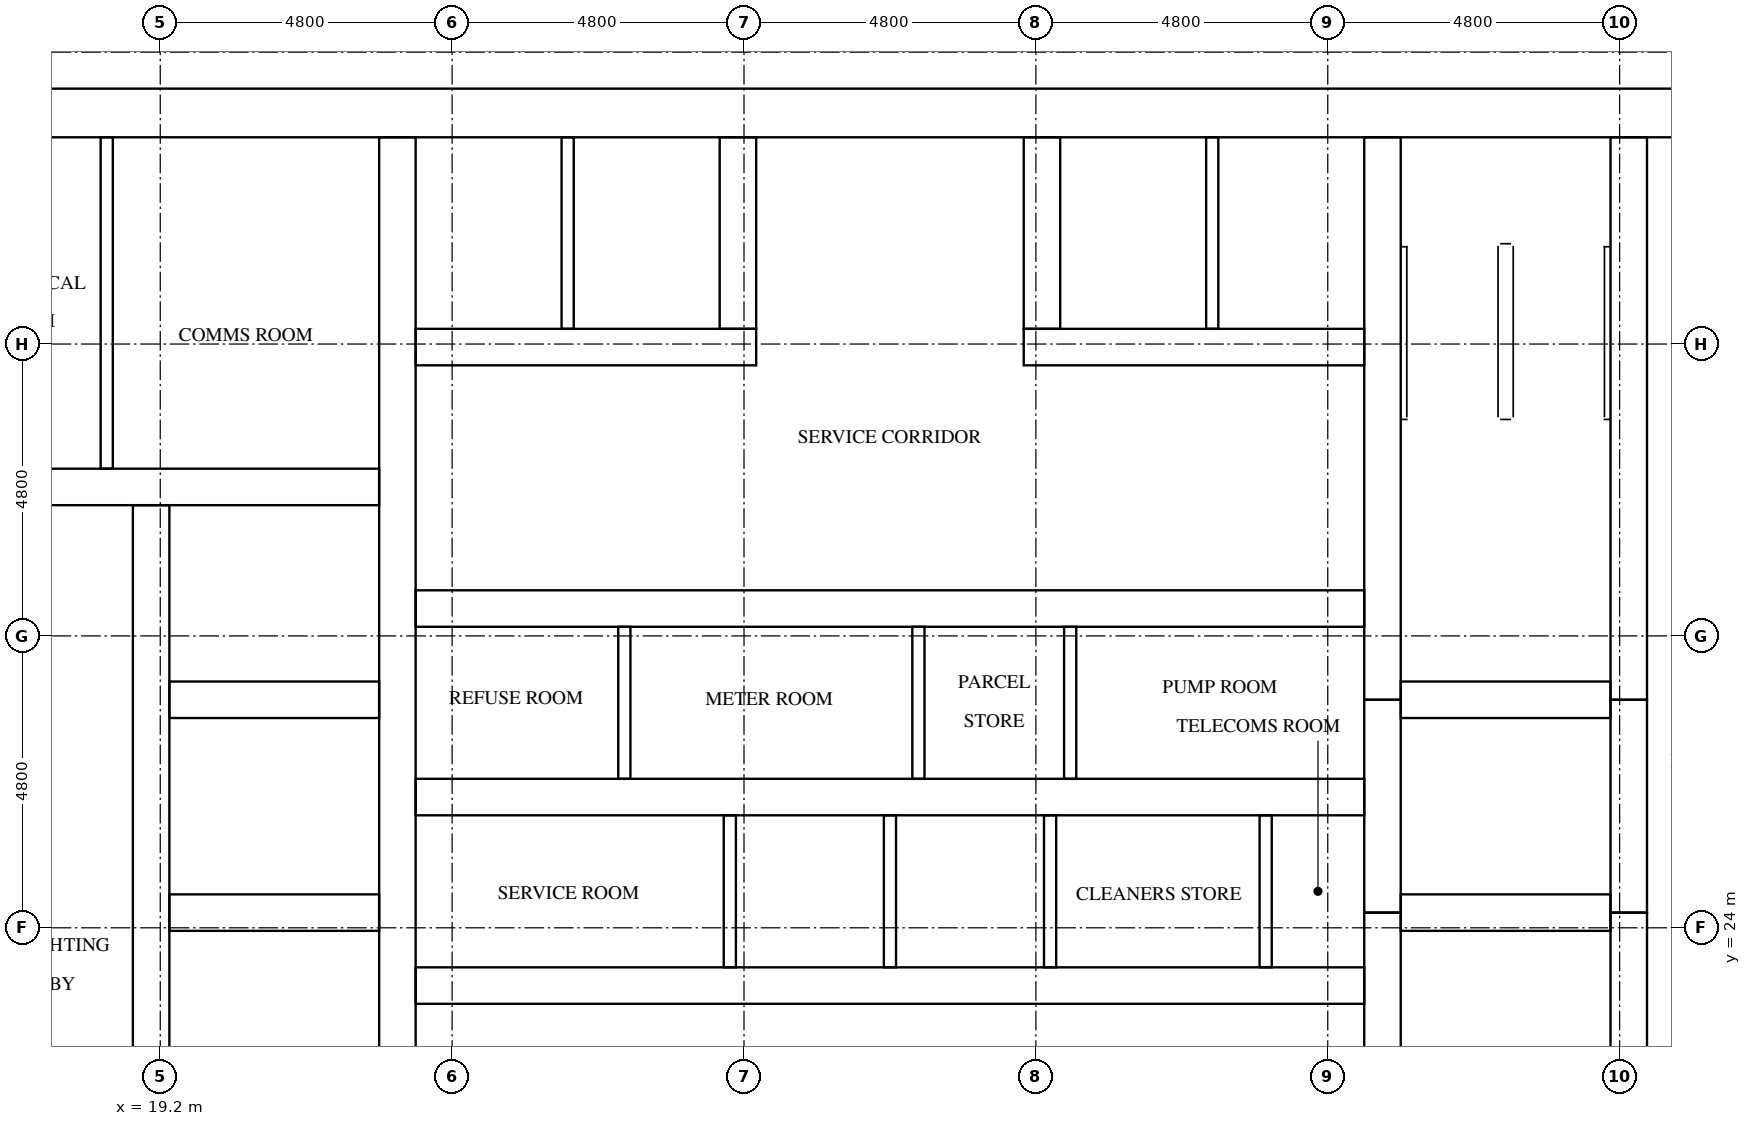
"""IFC4 building model, lengths in metres.
Left out: names, types, materials, properties, quantities, classifications, styles, units other than length and angle.
Written with IfcOpenShell. Run it as: python <this file> out.ifc"""

import sys

from ifc_helpers import new_model, si_unit, direction, frame, frame_2d, origin, place, context, subcontext, project, spatial, rectangle, extrude, element, fill, save


model = new_model("IFC4")
c1 = context("Model", 3, precision=1e-05, world=origin(), true_north=direction((0.0, 1.0)))
c2 = subcontext(c1, "Body", "Model", "MODEL_VIEW")
j1 = project(units=[si_unit("LENGTHUNIT", "METRE"), si_unit("PLANEANGLEUNIT", "RADIAN")], contexts=[c1])
p1 = place(None, origin())
s1 = spatial("IfcSite", under=j1, at=p1, CompositionType="ELEMENT")
p2 = place(p1, origin())
s2 = spatial("IfcBuilding", under=s1, at=p2, CompositionType="ELEMENT")
p3 = place(p2, frame((0.0, 0.0, 136.6)))
s3 = spatial("IfcBuildingStorey", under=s2, at=p3, CompositionType="ELEMENT", Elevation=136.6)
p4 = place(p3, frame((15.0, 37.4, 0.0), z_axis=(0.0, 0.0, 1.0), x_axis=(1.0, 0.0, 0.0)))
e1 = element("IfcWall", 1, at=p4, inside=s3, PredefinedType="SHEAR", context=c2, shape_type="SweptSolid", body=[
    extrude(rectangle(XDim=32.4, YDim=0.8, at=frame_2d((16.2, 0.0))), origin(), (0.0, 0.0, 1.0), 3.2),
])
p5 = place(p4, frame((15.3, 0.0, 0.0)))
e2 = element("IfcOpeningElement", 2, at=p5, cuts=e1, PredefinedType="OPENING", context=c2, shape_type="SweptSolid", body=[
    extrude(rectangle(XDim=1.8, YDim=2.1, at=frame_2d((0.9, 1.05))), frame((0.0, 0.41, 0.0), z_axis=(0.0, -1.0, 0.0), x_axis=(1.0, 0.0, 0.0)), (0.0, 0.0, 1.0), 0.82),
])
p6 = place(p4, frame((1.51, 0.0, 0.0)))
e3 = element("IfcOpeningElement", 3, at=p6, cuts=e1, PredefinedType="OPENING", context=c2, shape_type="SweptSolid", body=[
    extrude(rectangle(XDim=1.0, YDim=2.1, at=frame_2d((0.5, 1.05))), frame((0.0, 0.41, 0.0), z_axis=(0.0, -1.0, 0.0), x_axis=(1.0, 0.0, 0.0)), (0.0, 0.0, 1.0), 0.82),
])
p7 = place(p4, frame((5.11, 0.0, 0.0)))
e4 = element("IfcOpeningElement", 4, at=p7, cuts=e1, PredefinedType="OPENING", context=c2, shape_type="SweptSolid", body=[
    extrude(rectangle(XDim=1.0, YDim=2.1, at=frame_2d((0.5, 1.05))), frame((0.0, 0.41, 0.0), z_axis=(0.0, -1.0, 0.0), x_axis=(1.0, 0.0, 0.0)), (0.0, 0.0, 1.0), 0.82),
])
p8 = place(p3, frame((19.05, 15.8, 0.0), z_axis=(0.0, 0.0, 1.0), x_axis=(0.0, 1.0, 0.0)))
e5 = element("IfcWall", 5, at=p8, inside=s3, PredefinedType="SHEAR", context=c2, shape_type="SweptSolid", body=[
    extrude(rectangle(XDim=15.15, YDim=0.6, at=frame_2d((7.575, 0.0))), origin(), (0.0, 0.0, 1.0), 3.2),
])
p9 = place(p8, frame((9.65, 0.0, 0.0)))
e6 = element("IfcOpeningElement", 6, at=p9, cuts=e5, PredefinedType="OPENING", context=c2, shape_type="SweptSolid", body=[
    extrude(rectangle(XDim=1.1, YDim=2.1, at=frame_2d((0.55, 1.05))), frame((0.0, 0.31, 0.0), z_axis=(0.0, -1.0, 0.0), x_axis=(1.0, 0.0, 0.0)), (0.0, 0.0, 1.0), 0.62),
])
p10 = place(p8, frame((13.15, 0.0, 0.0)))
e7 = element("IfcOpeningElement", 7, at=p10, cuts=e5, PredefinedType="OPENING", context=c2, shape_type="SweptSolid", body=[
    extrude(rectangle(XDim=1.1, YDim=2.1, at=frame_2d((0.55, 1.05))), frame((0.0, 0.31, 0.0), z_axis=(0.0, -1.0, 0.0), x_axis=(1.0, 0.0, 0.0)), (0.0, 0.0, 1.0), 0.62),
])
p11 = place(p8, frame((0.4, 0.0, 0.0)))
e8 = element("IfcOpeningElement", 8, at=p11, cuts=e5, PredefinedType="OPENING", context=c2, shape_type="SweptSolid", body=[
    extrude(rectangle(XDim=1.2, YDim=2.1, at=frame_2d((0.6, 1.05))), frame((0.0, 0.31, 0.0), z_axis=(0.0, -1.0, 0.0), x_axis=(1.0, 0.0, 0.0)), (0.0, 0.0, 1.0), 0.62),
])
p12 = place(p3, frame((23.1, 15.8, 0.0), z_axis=(0.0, 0.0, 1.0), x_axis=(0.0, 1.0, 0.0)))
e9 = element("IfcWall", 9, at=p12, inside=s3, PredefinedType="SHEAR", context=c2, shape_type="SweptSolid", body=[
    extrude(rectangle(XDim=21.2, YDim=0.6, at=frame_2d((10.6, 0.0))), origin(), (0.0, 0.0, 1.0), 3.2),
])
p13 = place(p3, frame((39.3, 15.8, 0.0), z_axis=(0.0, 0.0, 1.0), x_axis=(0.0, 1.0, 0.0)))
e10 = element("IfcWall", 10, at=p13, inside=s3, PredefinedType="SHEAR", context=c2, shape_type="SweptSolid", body=[
    extrude(rectangle(XDim=8.45, YDim=0.6, at=frame_2d((4.225, 0.0))), origin(), (0.0, 0.0, 1.0), 3.2),
])
p14 = place(p3, frame((39.3, 24.25, 0.0), z_axis=(0.0, 0.0, 1.0), x_axis=(0.0, 1.0, 0.0)))
e11 = element("IfcWall", 11, at=p14, inside=s3, PredefinedType="SHEAR", context=c2, shape_type="SweptSolid", body=[
    extrude(rectangle(XDim=3.5, YDim=0.6, at=frame_2d((1.75, 0.0))), origin(), (0.0, 0.0, 1.0), 3.2),
])
p15 = place(p3, frame((39.3, 27.75, 0.0), z_axis=(0.0, 0.0, 1.0), x_axis=(0.0, 1.0, 0.0)))
e12 = element("IfcWall", 12, at=p15, inside=s3, PredefinedType="SHEAR", context=c2, shape_type="SweptSolid", body=[
    extrude(rectangle(XDim=9.25, YDim=0.6, at=frame_2d((4.625, 0.0))), origin(), (0.0, 0.0, 1.0), 3.2),
])
p16 = place(p3, frame((43.35, 15.8, 0.0), z_axis=(0.0, 0.0, 1.0), x_axis=(0.0, 1.0, 0.0)))
e13 = element("IfcWall", 13, at=p16, inside=s3, PredefinedType="SHEAR", context=c2, shape_type="SweptSolid", body=[
    extrude(rectangle(XDim=8.45, YDim=0.6, at=frame_2d((4.225, 0.0))), origin(), (0.0, 0.0, 1.0), 3.2),
])
p17 = place(p16, frame((0.4, 0.0, 0.0)))
e14 = element("IfcOpeningElement", 14, at=p17, cuts=e13, PredefinedType="OPENING", context=c2, shape_type="SweptSolid", body=[
    extrude(rectangle(XDim=1.2, YDim=2.1, at=frame_2d((0.6, 1.05))), frame((0.0, 0.31, 0.0), z_axis=(0.0, -1.0, 0.0), x_axis=(1.0, 0.0, 0.0)), (0.0, 0.0, 1.0), 0.62),
])
p18 = place(p3, frame((43.35, 24.25, 0.0), z_axis=(0.0, 0.0, 1.0), x_axis=(0.0, 1.0, 0.0)))
e15 = element("IfcWall", 15, at=p18, inside=s3, PredefinedType="SHEAR", context=c2, shape_type="SweptSolid", body=[
    extrude(rectangle(XDim=3.5, YDim=0.6, at=frame_2d((1.75, 0.0))), origin(), (0.0, 0.0, 1.0), 3.2),
])
p19 = place(p18, frame((1.2, 0.0, 0.0)))
e16 = element("IfcOpeningElement", 16, at=p19, cuts=e15, PredefinedType="OPENING", context=c2, shape_type="SweptSolid", body=[
    extrude(rectangle(XDim=1.1, YDim=2.1, at=frame_2d((0.55, 1.05))), frame((0.0, 0.31, 0.0), z_axis=(0.0, -1.0, 0.0), x_axis=(1.0, 0.0, 0.0)), (0.0, 0.0, 1.0), 0.62),
])
p20 = place(p3, frame((43.35, 27.75, 0.0), z_axis=(0.0, 0.0, 1.0), x_axis=(0.0, 1.0, 0.0)))
e17 = element("IfcWall", 17, at=p20, inside=s3, PredefinedType="SHEAR", context=c2, shape_type="SweptSolid", body=[
    extrude(rectangle(XDim=9.25, YDim=0.6, at=frame_2d((4.625, 0.0))), origin(), (0.0, 0.0, 1.0), 3.2),
])
p21 = place(p20, frame((7.65, 0.0, 0.0)))
e18 = element("IfcOpeningElement", 18, at=p21, cuts=e17, PredefinedType="OPENING", context=c2, shape_type="SweptSolid", body=[
    extrude(rectangle(XDim=1.2, YDim=2.1, at=frame_2d((0.6, 1.05))), frame((0.0, 0.31, 0.0), z_axis=(0.0, -1.0, 0.0), x_axis=(1.0, 0.0, 0.0)), (0.0, 0.0, 1.0), 0.62),
])
for number, where, z_axis, x_axis in (
    (19, (19.35, 24.25, 0.0), (0.0, 0.0, 1.0), (1.0, 0.0, 0.0)),
    (20, (19.35, 27.75, 0.0), (0.0, 0.0, 1.0), (1.0, 0.0, 0.0)),
):
    element("IfcWall", number, at=place(p3, frame(where, z_axis=z_axis, x_axis=x_axis)), inside=s3, PredefinedType="SHEAR", context=c2, shape_type="SweptSolid", body=[
        extrude(rectangle(XDim=3.45, YDim=0.6, at=frame_2d((1.725, 0.0))), origin(), (0.0, 0.0, 1.0), 3.2),
    ])
p22 = place(p3, frame((15.8, 31.25, 0.0), z_axis=(0.0, 0.0, 1.0), x_axis=(1.0, 0.0, 0.0)))
e21 = element("IfcWall", 21, at=p22, inside=s3, PredefinedType="SHEAR", context=c2, shape_type="SweptSolid", body=[
    extrude(rectangle(XDim=7.0, YDim=0.6, at=frame_2d((3.5, 0.0))), origin(), (0.0, 0.0, 1.0), 3.2),
])
for number, where, z_axis, x_axis in (
    (22, (39.6, 24.25, 0.0), (0.0, 0.0, 1.0), (1.0, 0.0, 0.0)),
    (23, (39.6, 27.75, 0.0), (0.0, 0.0, 1.0), (1.0, 0.0, 0.0)),
):
    element("IfcWall", number, at=place(p3, frame(where, z_axis=z_axis, x_axis=x_axis)), inside=s3, PredefinedType="SHEAR", context=c2, shape_type="SweptSolid", body=[
        extrude(rectangle(XDim=3.45, YDim=0.6, at=frame_2d((1.725, 0.0))), origin(), (0.0, 0.0, 1.0), 3.2),
    ])
p23 = place(p3, frame((23.4, 23.05, 0.0), z_axis=(0.0, 0.0, 1.0), x_axis=(1.0, 0.0, 0.0)))
e24 = element("IfcWall", 24, at=p23, inside=s3, PredefinedType="SHEAR", context=c2, shape_type="SweptSolid", body=[
    extrude(rectangle(XDim=15.6, YDim=0.6, at=frame_2d((7.8, 0.0))), origin(), (0.0, 0.0, 1.0), 3.2),
])
p24 = place(p23, frame((2.033, 0.0, 0.0)))
e25 = element("IfcOpeningElement", 25, at=p24, cuts=e24, PredefinedType="OPENING", context=c2, shape_type="SweptSolid", body=[
    extrude(rectangle(XDim=1.0, YDim=2.1, at=frame_2d((0.5, 1.05))), frame((0.0, 0.31, 0.0), z_axis=(0.0, -1.0, 0.0), x_axis=(1.0, 0.0, 0.0)), (0.0, 0.0, 1.0), 0.62),
])
p25 = place(p23, frame((11.706, 0.0, 0.0)))
e26 = element("IfcOpeningElement", 26, at=p25, cuts=e24, PredefinedType="OPENING", context=c2, shape_type="SweptSolid", body=[
    extrude(rectangle(XDim=1.0, YDim=2.1, at=frame_2d((0.5, 1.05))), frame((0.0, 0.31, 0.0), z_axis=(0.0, -1.0, 0.0), x_axis=(1.0, 0.0, 0.0)), (0.0, 0.0, 1.0), 0.62),
])
p26 = place(p23, frame((14.339, 0.0, 0.0)))
e27 = element("IfcOpeningElement", 27, at=p26, cuts=e24, PredefinedType="OPENING", context=c2, shape_type="SweptSolid", body=[
    extrude(rectangle(XDim=1.0, YDim=2.1, at=frame_2d((0.5, 1.05))), frame((0.0, 0.31, 0.0), z_axis=(0.0, -1.0, 0.0), x_axis=(1.0, 0.0, 0.0)), (0.0, 0.0, 1.0), 0.62),
])
p27 = place(p3, frame((23.4, 26.15, 0.0), z_axis=(0.0, 0.0, 1.0), x_axis=(1.0, 0.0, 0.0)))
e28 = element("IfcWall", 28, at=p27, inside=s3, PredefinedType="SHEAR", context=c2, shape_type="SweptSolid", body=[
    extrude(rectangle(XDim=15.6, YDim=0.6, at=frame_2d((7.8, 0.0))), origin(), (0.0, 0.0, 1.0), 3.2),
])
p28 = place(p3, frame((23.4, 29.25, 0.0), z_axis=(0.0, 0.0, 1.0), x_axis=(1.0, 0.0, 0.0)))
e29 = element("IfcWall", 29, at=p28, inside=s3, PredefinedType="SHEAR", context=c2, shape_type="SweptSolid", body=[
    extrude(rectangle(XDim=15.6, YDim=0.6, at=frame_2d((7.8, 0.0))), origin(), (0.0, 0.0, 1.0), 3.2),
])
p29 = place(p28, frame((1.166, 0.0, 0.0)))
e30 = element("IfcOpeningElement", 30, at=p29, cuts=e29, PredefinedType="OPENING", context=c2, shape_type="SweptSolid", body=[
    extrude(rectangle(XDim=1.0, YDim=2.1, at=frame_2d((0.5, 1.05))), frame((0.0, 0.31, 0.0), z_axis=(0.0, -1.0, 0.0), x_axis=(1.0, 0.0, 0.0)), (0.0, 0.0, 1.0), 0.62),
])
p30 = place(p28, frame((5.35, 0.0, 0.0)))
e31 = element("IfcOpeningElement", 31, at=p30, cuts=e29, PredefinedType="OPENING", context=c2, shape_type="SweptSolid", body=[
    extrude(rectangle(XDim=1.0, YDim=2.1, at=frame_2d((0.5, 1.05))), frame((0.0, 0.31, 0.0), z_axis=(0.0, -1.0, 0.0), x_axis=(1.0, 0.0, 0.0)), (0.0, 0.0, 1.0), 0.62),
])
p31 = place(p28, frame((9.016, 0.0, 0.0)))
e32 = element("IfcOpeningElement", 32, at=p31, cuts=e29, PredefinedType="OPENING", context=c2, shape_type="SweptSolid", body=[
    extrude(rectangle(XDim=1.0, YDim=2.1, at=frame_2d((0.5, 1.05))), frame((0.0, 0.31, 0.0), z_axis=(0.0, -1.0, 0.0), x_axis=(1.0, 0.0, 0.0)), (0.0, 0.0, 1.0), 0.62),
])
p32 = place(p28, frame((12.732, 0.0, 0.0)))
e33 = element("IfcOpeningElement", 33, at=p32, cuts=e29, PredefinedType="OPENING", context=c2, shape_type="SweptSolid", body=[
    extrude(rectangle(XDim=1.0, YDim=2.1, at=frame_2d((0.5, 1.05))), frame((0.0, 0.31, 0.0), z_axis=(0.0, -1.0, 0.0), x_axis=(1.0, 0.0, 0.0)), (0.0, 0.0, 1.0), 0.62),
])
for number, where, z_axis, x_axis in (
    (34, (23.4, 33.55, 0.0), (0.0, 0.0, 1.0), (1.0, 0.0, 0.0)),
    (35, (33.4, 33.55, 0.0), (0.0, 0.0, 1.0), (1.0, 0.0, 0.0)),
):
    element("IfcWall", number, at=place(p3, frame(where, z_axis=z_axis, x_axis=x_axis)), inside=s3, PredefinedType="SHEAR", context=c2, shape_type="SweptSolid", body=[
        extrude(rectangle(XDim=5.6, YDim=0.6, at=frame_2d((2.8, 0.0))), origin(), (0.0, 0.0, 1.0), 3.2),
    ])
for number, where, z_axis, x_axis in (
    (36, (28.7, 33.85, 0.0), (0.0, 0.0, 1.0), (0.0, 1.0, 0.0)),
    (37, (33.7, 33.85, 0.0), (0.0, 0.0, 1.0), (0.0, 1.0, 0.0)),
):
    element("IfcWall", number, at=place(p3, frame(where, z_axis=z_axis, x_axis=x_axis)), inside=s3, PredefinedType="SHEAR", context=c2, shape_type="SweptSolid", body=[
        extrude(rectangle(XDim=3.15, YDim=0.6, at=frame_2d((1.575, 0.0))), origin(), (0.0, 0.0, 1.0), 3.2),
    ])
for number, where, z_axis, x_axis in (
    (38, (28.567, 23.35, 0.0), (0.0, 0.0, 1.0), (0.0, 1.0, 0.0)),
    (39, (31.2, 23.35, 0.0), (0.0, 0.0, 1.0), (0.0, 1.0, 0.0)),
    (40, (33.833, 23.35, 0.0), (0.0, 0.0, 1.0), (0.0, 1.0, 0.0)),
):
    element("IfcWall", number, at=place(p3, frame(where, z_axis=z_axis, x_axis=x_axis)), inside=s3, PredefinedType="SOLIDWALL", context=c2, shape_type="SweptSolid", body=[
        extrude(rectangle(XDim=2.5, YDim=0.2, at=frame_2d((1.25, 0.0))), origin(), (0.0, 0.0, 1.0), 3.2),
    ])
for number, where, z_axis, x_axis in (
    (41, (25.9, 33.85, 0.0), (0.0, 0.0, 1.0), (0.0, 1.0, 0.0)),
    (42, (36.5, 33.85, 0.0), (0.0, 0.0, 1.0), (0.0, 1.0, 0.0)),
):
    element("IfcWall", number, at=place(p3, frame(where, z_axis=z_axis, x_axis=x_axis)), inside=s3, PredefinedType="SOLIDWALL", context=c2, shape_type="SweptSolid", body=[
        extrude(rectangle(XDim=3.15, YDim=0.2, at=frame_2d((1.575, 0.0))), origin(), (0.0, 0.0, 1.0), 3.2),
    ])
p33 = place(p3, frame((18.32, 31.55, 0.0), z_axis=(0.0, 0.0, 1.0), x_axis=(0.0, 1.0, 0.0)))
e43 = element("IfcWall", 43, at=p33, inside=s3, PredefinedType="PARTITIONING", context=c2, shape_type="SweptSolid", body=[
    extrude(rectangle(XDim=5.45, YDim=0.2, at=frame_2d((2.725, 0.0))), origin(), (0.0, 0.0, 1.0), 3.2),
])
for number, where, z_axis, x_axis in (
    (44, (37.379, 23.35, 0.0), (0.0, 0.0, 1.0), (0.0, 1.0, 0.0)),
    (45, (26.832, 26.45, 0.0), (0.0, 0.0, 1.0), (0.0, 1.0, 0.0)),
    (46, (31.668, 26.45, 0.0), (0.0, 0.0, 1.0), (0.0, 1.0, 0.0)),
    (47, (34.164, 26.45, 0.0), (0.0, 0.0, 1.0), (0.0, 1.0, 0.0)),
):
    element("IfcWall", number, at=place(p3, frame(where, z_axis=z_axis, x_axis=x_axis)), inside=s3, PredefinedType="PARTITIONING", context=c2, shape_type="SweptSolid", body=[
        extrude(rectangle(XDim=2.5, YDim=0.2, at=frame_2d((1.25, 0.0))), origin(), (0.0, 0.0, 1.0), 3.2),
    ])
p34 = place(p9, origin())
e48 = element("IfcDoor", 48, at=p34, inside=s3, OperationType="DOUBLE_DOOR_SLIDING", PredefinedType="DOOR", context=c2, shape_type="SweptSolid", body=[
    extrude(rectangle(XDim=1.1, YDim=2.1, at=frame_2d((0.55, 1.05))), frame((0.0, 0.025, 0.0), z_axis=(0.0, -1.0, 0.0), x_axis=(1.0, 0.0, 0.0)), (0.0, 0.0, 1.0), 0.05),
])
fill(e6, e48)
p35 = place(p10, origin())
e49 = element("IfcDoor", 49, at=p35, inside=s3, OperationType="DOUBLE_DOOR_SLIDING", PredefinedType="DOOR", context=c2, shape_type="SweptSolid", body=[
    extrude(rectangle(XDim=1.1, YDim=2.1, at=frame_2d((0.55, 1.05))), frame((0.0, 0.025, 0.0), z_axis=(0.0, -1.0, 0.0), x_axis=(1.0, 0.0, 0.0)), (0.0, 0.0, 1.0), 0.05),
])
fill(e7, e49)
p36 = place(p19, origin())
e50 = element("IfcDoor", 50, at=p36, inside=s3, OperationType="DOUBLE_DOOR_SLIDING", PredefinedType="DOOR", context=c2, shape_type="SweptSolid", body=[
    extrude(rectangle(XDim=1.1, YDim=2.1, at=frame_2d((0.55, 1.05))), frame((0.0, 0.025, 0.0), z_axis=(0.0, -1.0, 0.0), x_axis=(1.0, 0.0, 0.0)), (0.0, 0.0, 1.0), 0.05),
])
fill(e16, e50)
p37 = place(p21, origin())
e51 = element("IfcDoor", 51, at=p37, inside=s3, OperationType="SINGLE_SWING_LEFT", PredefinedType="DOOR", context=c2, shape_type="SweptSolid", body=[
    extrude(rectangle(XDim=1.2, YDim=2.1, at=frame_2d((0.6, 1.05))), frame((0.0, 0.025, 0.0), z_axis=(0.0, -1.0, 0.0), x_axis=(1.0, 0.0, 0.0)), (0.0, 0.0, 1.0), 0.05),
])
fill(e18, e51)
p38 = place(p5, origin())
e52 = element("IfcDoor", 52, at=p38, inside=s3, OperationType="DOUBLE_DOOR_SINGLE_SWING", PredefinedType="DOOR", context=c2, shape_type="SweptSolid", body=[
    extrude(rectangle(XDim=1.8, YDim=2.1, at=frame_2d((0.9, 1.05))), frame((0.0, 0.025, 0.0), z_axis=(0.0, -1.0, 0.0), x_axis=(1.0, 0.0, 0.0)), (0.0, 0.0, 1.0), 0.05),
])
fill(e2, e52)
p39 = place(p6, origin())
e53 = element("IfcDoor", 53, at=p39, inside=s3, OperationType="SINGLE_SWING_RIGHT", PredefinedType="DOOR", context=c2, shape_type="SweptSolid", body=[
    extrude(rectangle(XDim=1.0, YDim=2.1, at=frame_2d((0.5, 1.05))), frame((0.0, 0.025, 0.0), z_axis=(0.0, -1.0, 0.0), x_axis=(1.0, 0.0, 0.0)), (0.0, 0.0, 1.0), 0.05),
])
fill(e3, e53)
p40 = place(p7, origin())
e54 = element("IfcDoor", 54, at=p40, inside=s3, OperationType="SINGLE_SWING_LEFT", PredefinedType="DOOR", context=c2, shape_type="SweptSolid", body=[
    extrude(rectangle(XDim=1.0, YDim=2.1, at=frame_2d((0.5, 1.05))), frame((0.0, 0.025, 0.0), z_axis=(0.0, -1.0, 0.0), x_axis=(1.0, 0.0, 0.0)), (0.0, 0.0, 1.0), 0.05),
])
fill(e4, e54)
p41 = place(p24, frame((1.0, 0.0, 0.0), z_axis=(0.0, 0.0, 1.0), x_axis=(-1.0, 0.0, 0.0)))
e55 = element("IfcDoor", 55, at=p41, inside=s3, OperationType="SINGLE_SWING_RIGHT", PredefinedType="DOOR", context=c2, shape_type="SweptSolid", body=[
    extrude(rectangle(XDim=1.0, YDim=2.1, at=frame_2d((0.5, 1.05))), frame((0.0, 0.025, 0.0), z_axis=(0.0, -1.0, 0.0), x_axis=(1.0, 0.0, 0.0)), (0.0, 0.0, 1.0), 0.05),
])
fill(e25, e55)
p42 = place(p25, frame((1.0, 0.0, 0.0), z_axis=(0.0, 0.0, 1.0), x_axis=(-1.0, 0.0, 0.0)))
e56 = element("IfcDoor", 56, at=p42, inside=s3, OperationType="SINGLE_SWING_LEFT", PredefinedType="DOOR", context=c2, shape_type="SweptSolid", body=[
    extrude(rectangle(XDim=1.0, YDim=2.1, at=frame_2d((0.5, 1.05))), frame((0.0, 0.025, 0.0), z_axis=(0.0, -1.0, 0.0), x_axis=(1.0, 0.0, 0.0)), (0.0, 0.0, 1.0), 0.05),
])
fill(e26, e56)
p43 = place(p26, frame((1.0, 0.0, 0.0), z_axis=(0.0, 0.0, 1.0), x_axis=(-1.0, 0.0, 0.0)))
e57 = element("IfcDoor", 57, at=p43, inside=s3, OperationType="SINGLE_SWING_RIGHT", PredefinedType="DOOR", context=c2, shape_type="SweptSolid", body=[
    extrude(rectangle(XDim=1.0, YDim=2.1, at=frame_2d((0.5, 1.05))), frame((0.0, 0.025, 0.0), z_axis=(0.0, -1.0, 0.0), x_axis=(1.0, 0.0, 0.0)), (0.0, 0.0, 1.0), 0.05),
])
fill(e27, e57)
p44 = place(p29, origin())
e58 = element("IfcDoor", 58, at=p44, inside=s3, OperationType="SINGLE_SWING_LEFT", PredefinedType="DOOR", context=c2, shape_type="SweptSolid", body=[
    extrude(rectangle(XDim=1.0, YDim=2.1, at=frame_2d((0.5, 1.05))), frame((0.0, 0.025, 0.0), z_axis=(0.0, -1.0, 0.0), x_axis=(1.0, 0.0, 0.0)), (0.0, 0.0, 1.0), 0.05),
])
fill(e30, e58)
p45 = place(p30, origin())
e59 = element("IfcDoor", 59, at=p45, inside=s3, OperationType="SINGLE_SWING_RIGHT", PredefinedType="DOOR", context=c2, shape_type="SweptSolid", body=[
    extrude(rectangle(XDim=1.0, YDim=2.1, at=frame_2d((0.5, 1.05))), frame((0.0, 0.025, 0.0), z_axis=(0.0, -1.0, 0.0), x_axis=(1.0, 0.0, 0.0)), (0.0, 0.0, 1.0), 0.05),
])
fill(e31, e59)
p46 = place(p31, origin())
e60 = element("IfcDoor", 60, at=p46, inside=s3, OperationType="SINGLE_SWING_LEFT", PredefinedType="DOOR", context=c2, shape_type="SweptSolid", body=[
    extrude(rectangle(XDim=1.0, YDim=2.1, at=frame_2d((0.5, 1.05))), frame((0.0, 0.025, 0.0), z_axis=(0.0, -1.0, 0.0), x_axis=(1.0, 0.0, 0.0)), (0.0, 0.0, 1.0), 0.05),
])
fill(e32, e60)
p47 = place(p32, origin())
e61 = element("IfcDoor", 61, at=p47, inside=s3, OperationType="SINGLE_SWING_RIGHT", PredefinedType="DOOR", context=c2, shape_type="SweptSolid", body=[
    extrude(rectangle(XDim=1.0, YDim=2.1, at=frame_2d((0.5, 1.05))), frame((0.0, 0.025, 0.0), z_axis=(0.0, -1.0, 0.0), x_axis=(1.0, 0.0, 0.0)), (0.0, 0.0, 1.0), 0.05),
])
fill(e33, e61)
save(model, sys.argv[1])
